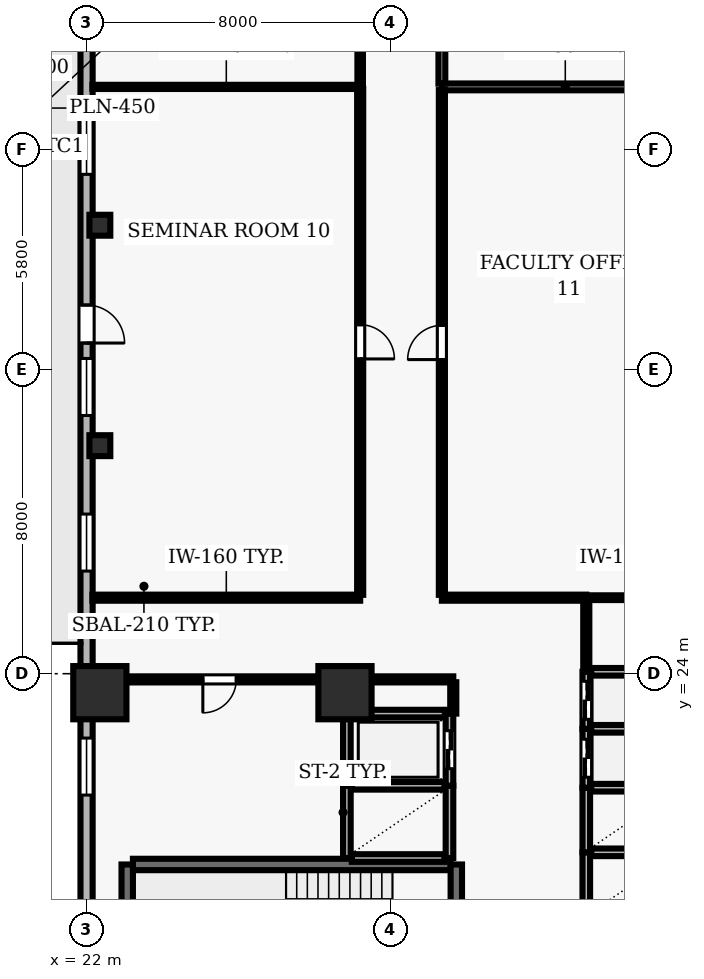
"""IFC4 building model, lengths in metres.
Left out: names, types, materials, properties, quantities, classifications, styles, units other than length and angle.
Written with IfcOpenShell. Run it as: python <this file> out.ifc"""

import sys

from ifc_helpers import new_model, si_unit, direction, frame, frame_2d, origin, origin_2d, place, context, subcontext, project, spatial, rectangle, hollow_rectangle, extrude, element, fill, save


model = new_model("IFC4")
c1 = context("Model", 3, precision=1e-05, world=origin(), true_north=direction((0.0, 1.0)))
c2 = subcontext(c1, "Body", "Model", "MODEL_VIEW")
j1 = project(units=[si_unit("LENGTHUNIT", "METRE"), si_unit("PLANEANGLEUNIT", "RADIAN")], contexts=[c1])
p1 = place(None, origin())
s1 = spatial("IfcSite", under=j1, at=p1, CompositionType="ELEMENT")
p2 = place(p1, origin())
s2 = spatial("IfcBuilding", under=s1, at=p2, CompositionType="ELEMENT")
p3 = place(p2, frame((0.0, 0.0, 58.3)))
s3 = spatial("IfcBuildingStorey", under=s2, at=p3, CompositionType="ELEMENT", Elevation=58.3)
for number, where, z_axis, x_axis in (
    (1, (22.35, 23.5, 0.0), (0.0, 0.0, 1.0), (1.0, 0.0, 0.0)),
    (2, (28.8, 23.5, 0.0), (0.0, 0.0, 1.0), (1.0, 0.0, 0.0)),
):
    element("IfcColumn", number, at=place(p3, frame(where, z_axis=z_axis, x_axis=x_axis)), inside=s3, PredefinedType="COLUMN", context=c2, shape_type="SweptSolid", body=[
        extrude(rectangle(XDim=1.4, YDim=1.4, at=origin_2d()), origin(), (0.0, 0.0, 1.0), 3.9),
    ])
for number, where, z_axis, x_axis in (
    (3, (22.35, 30.0, 0.0), (0.0, 0.0, 1.0), (1.0, 0.0, 0.0)),
    (4, (22.35, 35.8, 0.0), (0.0, 0.0, 1.0), (1.0, 0.0, 0.0)),
):
    element("IfcColumn", number, at=place(p3, frame(where, z_axis=z_axis, x_axis=x_axis)), inside=s3, PredefinedType="COLUMN", context=c2, shape_type="SweptSolid", body=[
        extrude(hollow_rectangle(XDim=0.55, YDim=0.55, WallThickness=0.025, at=origin_2d()), origin(), (0.0, 0.0, 1.0), 3.9),
    ])
p4 = place(p3, frame((22.0, 51.5, 0.0), z_axis=(0.0, 0.0, 1.0), x_axis=(0.0, -1.0, 0.0)))
e5 = element("IfcWall", 5, at=p4, inside=s3, PredefinedType="SOLIDWALL", context=c2, shape_type="SweptSolid", body=[
    extrude(rectangle(XDim=49.0, YDim=0.32, at=frame_2d((24.5, 0.0))), origin(), (0.0, 0.0, 1.0), 3.69),
])
p5 = place(p4, frame((17.8, 0.0, 0.0)))
e6 = element("IfcOpeningElement", 6, at=p5, cuts=e5, PredefinedType="OPENING", context=c2, shape_type="SweptSolid", body=[
    extrude(rectangle(XDim=1.0, YDim=2.2, at=frame_2d((0.5, 1.1))), frame((0.0, 0.17, 0.0), z_axis=(0.0, -1.0, 0.0), x_axis=(1.0, 0.0, 0.0)), (0.0, 0.0, 1.0), 0.34),
])
p6 = place(p4, frame((1.972, 0.0, 0.9)))
e7 = element("IfcOpeningElement", 7, at=p6, cuts=e5, PredefinedType="OPENING", context=c2, shape_type="SweptSolid", body=[
    extrude(rectangle(XDim=1.5, YDim=1.6, at=frame_2d((0.75, 0.8))), frame((0.0, 0.17, 0.0), z_axis=(0.0, -1.0, 0.0), x_axis=(1.0, 0.0, 0.0)), (0.0, 0.0, 1.0), 0.34),
])
p7 = place(p4, frame((7.417, 0.0, 0.9)))
e8 = element("IfcOpeningElement", 8, at=p7, cuts=e5, PredefinedType="OPENING", context=c2, shape_type="SweptSolid", body=[
    extrude(rectangle(XDim=1.5, YDim=1.6, at=frame_2d((0.75, 0.8))), frame((0.0, 0.17, 0.0), z_axis=(0.0, -1.0, 0.0), x_axis=(1.0, 0.0, 0.0)), (0.0, 0.0, 1.0), 0.34),
])
p8 = place(p4, frame((12.861, 0.0, 0.9)))
e9 = element("IfcOpeningElement", 9, at=p8, cuts=e5, PredefinedType="OPENING", context=c2, shape_type="SweptSolid", body=[
    extrude(rectangle(XDim=1.5, YDim=1.6, at=frame_2d((0.75, 0.8))), frame((0.0, 0.17, 0.0), z_axis=(0.0, -1.0, 0.0), x_axis=(1.0, 0.0, 0.0)), (0.0, 0.0, 1.0), 0.34),
])
p9 = place(p4, frame((19.206, 0.0, 0.9)))
e10 = element("IfcOpeningElement", 10, at=p9, cuts=e5, PredefinedType="OPENING", context=c2, shape_type="SweptSolid", body=[
    extrude(rectangle(XDim=1.5, YDim=1.6, at=frame_2d((0.75, 0.8))), frame((0.0, 0.17, 0.0), z_axis=(0.0, -1.0, 0.0), x_axis=(1.0, 0.0, 0.0)), (0.0, 0.0, 1.0), 0.34),
])
p10 = place(p4, frame((23.3, 0.0, 0.9)))
e11 = element("IfcOpeningElement", 11, at=p10, cuts=e5, PredefinedType="OPENING", context=c2, shape_type="SweptSolid", body=[
    extrude(rectangle(XDim=1.5, YDim=1.6, at=frame_2d((0.75, 0.8))), frame((0.0, 0.17, 0.0), z_axis=(0.0, -1.0, 0.0), x_axis=(1.0, 0.0, 0.0)), (0.0, 0.0, 1.0), 0.34),
])
p11 = place(p4, frame((29.194, 0.0, 0.9)))
e12 = element("IfcOpeningElement", 12, at=p11, cuts=e5, PredefinedType="OPENING", context=c2, shape_type="SweptSolid", body=[
    extrude(rectangle(XDim=1.5, YDim=1.6, at=frame_2d((0.75, 0.8))), frame((0.0, 0.17, 0.0), z_axis=(0.0, -1.0, 0.0), x_axis=(1.0, 0.0, 0.0)), (0.0, 0.0, 1.0), 0.34),
])
p12 = place(p4, frame((34.189, 0.0, 0.9)))
e13 = element("IfcOpeningElement", 13, at=p12, cuts=e5, PredefinedType="OPENING", context=c2, shape_type="SweptSolid", body=[
    extrude(rectangle(XDim=1.5, YDim=1.6, at=frame_2d((0.75, 0.8))), frame((0.0, 0.17, 0.0), z_axis=(0.0, -1.0, 0.0), x_axis=(1.0, 0.0, 0.0)), (0.0, 0.0, 1.0), 0.34),
])
p13 = place(p4, frame((40.083, 0.0, 0.9)))
e14 = element("IfcOpeningElement", 14, at=p13, cuts=e5, PredefinedType="OPENING", context=c2, shape_type="SweptSolid", body=[
    extrude(rectangle(XDim=1.5, YDim=1.6, at=frame_2d((0.75, 0.8))), frame((0.0, 0.17, 0.0), z_axis=(0.0, -1.0, 0.0), x_axis=(1.0, 0.0, 0.0)), (0.0, 0.0, 1.0), 0.34),
])
p14 = place(p3, frame((31.58, 18.98, 0.0), z_axis=(0.0, 0.0, 1.0), x_axis=(-1.0, 0.0, 0.0)))
e15 = element("IfcWall", 15, at=p14, inside=s3, PredefinedType="SHEAR", context=c2, shape_type="SweptSolid", body=[
    extrude(rectangle(XDim=8.36, YDim=0.3, at=frame_2d((4.18, 0.0))), origin(), (0.0, 0.0, 1.0), 3.69),
])
p15 = place(p3, frame((23.07, 18.98, 0.0), z_axis=(0.0, 0.0, 1.0), x_axis=(0.0, -1.0, 0.0)))
e16 = element("IfcWall", 16, at=p15, inside=s3, PredefinedType="SHEAR", context=c2, shape_type="SweptSolid", body=[
    extrude(rectangle(XDim=3.51, YDim=0.3, at=frame_2d((1.755, 0.0))), origin(), (0.0, 0.0, 1.0), 3.69),
])
p16 = place(p3, frame((31.73, 15.47, 0.0), z_axis=(0.0, 0.0, 1.0), x_axis=(0.0, 1.0, 0.0)))
e17 = element("IfcWall", 17, at=p16, inside=s3, PredefinedType="SHEAR", context=c2, shape_type="SweptSolid", body=[
    extrude(rectangle(XDim=3.51, YDim=0.3, at=frame_2d((1.755, 0.0))), origin(), (0.0, 0.0, 1.0), 3.69),
])
p17 = place(p16, frame((1.18, 0.0, 0.0)))
e18 = element("IfcOpeningElement", 18, at=p17, cuts=e17, PredefinedType="OPENING", context=c2, shape_type="SweptSolid", body=[
    extrude(rectangle(XDim=1.15, YDim=2.15, at=frame_2d((0.575, 1.075))), frame((0.0, 0.16, 0.0), z_axis=(0.0, -1.0, 0.0), x_axis=(1.0, 0.0, 0.0)), (0.0, 0.0, 1.0), 0.32),
])
p18 = place(p3, frame((35.15, 19.3, 0.0), z_axis=(0.0, 0.0, 1.0), x_axis=(0.0, -1.0, 0.0)))
e19 = element("IfcWall", 19, at=p18, inside=s3, PredefinedType="SOLIDWALL", context=c2, shape_type="SweptSolid", body=[
    extrude(rectangle(XDim=1.7, YDim=0.2, at=frame_2d((0.85, 0.0))), origin(), (0.0, 0.0, 1.0), 3.69),
])
p19 = place(p3, frame((37.42, 19.3, 0.0), z_axis=(0.0, 0.0, 1.0), x_axis=(-1.0, 0.0, 0.0)))
e20 = element("IfcWall", 20, at=p19, inside=s3, PredefinedType="SOLIDWALL", context=c2, shape_type="SweptSolid", body=[
    extrude(rectangle(XDim=2.14, YDim=0.2, at=frame_2d((1.07, 0.0))), origin(), (0.0, 0.0, 1.0), 3.69),
])
p20 = place(p3, frame((35.15, 21.0, 0.0), z_axis=(0.0, 0.0, 1.0), x_axis=(0.0, -1.0, 0.0)))
e21 = element("IfcWall", 21, at=p20, inside=s3, PredefinedType="SOLIDWALL", context=c2, shape_type="SweptSolid", body=[
    extrude(rectangle(XDim=1.7, YDim=0.2, at=frame_2d((0.85, 0.0))), origin(), (0.0, 0.0, 1.0), 3.69),
])
p21 = place(p3, frame((37.42, 21.0, 0.0), z_axis=(0.0, 0.0, 1.0), x_axis=(-1.0, 0.0, 0.0)))
e22 = element("IfcWall", 22, at=p21, inside=s3, PredefinedType="SOLIDWALL", context=c2, shape_type="SweptSolid", body=[
    extrude(rectangle(XDim=2.14, YDim=0.2, at=frame_2d((1.07, 0.0))), origin(), (0.0, 0.0, 1.0), 3.69),
])
for number, where, z_axis, x_axis in (
    (23, (28.85, 21.05, 0.0), (0.0, 0.0, 1.0), (0.0, -1.0, 0.0)),
    (24, (31.55, 19.15, 0.0), (0.0, 0.0, 1.0), (0.0, 1.0, 0.0)),
):
    element("IfcWall", number, at=place(p3, frame(where, z_axis=z_axis, x_axis=x_axis)), inside=s3, PredefinedType="SOLIDWALL", context=c2, shape_type="SweptSolid", body=[
        extrude(rectangle(XDim=1.9, YDim=0.2, at=frame_2d((0.95, 0.0))), origin(), (0.0, 0.0, 1.0), 3.69),
    ])
for number, where, z_axis, x_axis in (
    (25, (28.98, 19.15, 0.0), (0.0, 0.0, 1.0), (1.0, 0.0, 0.0)),
    (26, (31.42, 21.05, 0.0), (0.0, 0.0, 1.0), (-1.0, 0.0, 0.0)),
):
    element("IfcWall", number, at=place(p3, frame(where, z_axis=z_axis, x_axis=x_axis)), inside=s3, PredefinedType="SOLIDWALL", context=c2, shape_type="SweptSolid", body=[
        extrude(rectangle(XDim=2.44, YDim=0.2, at=frame_2d((1.22, 0.0))), origin(), (0.0, 0.0, 1.0), 3.69),
    ])
p22 = place(p3, frame((35.15, 22.55, 0.0), z_axis=(0.0, 0.0, 1.0), x_axis=(0.0, -1.0, 0.0)))
e27 = element("IfcWall", 27, at=p22, inside=s3, PredefinedType="SOLIDWALL", context=c2, shape_type="SweptSolid", body=[
    extrude(rectangle(XDim=1.55, YDim=0.2, at=frame_2d((0.775, 0.0))), origin(), (0.0, 0.0, 1.0), 3.69),
])
p23 = place(p22, frame((0.275, 0.0, 0.0)))
e28 = element("IfcOpeningElement", 28, at=p23, cuts=e27, PredefinedType="OPENING", context=c2, shape_type="SweptSolid", body=[
    extrude(rectangle(XDim=1.0, YDim=2.1, at=frame_2d((0.5, 1.05))), frame((0.0, 0.11, 0.0), z_axis=(0.0, -1.0, 0.0), x_axis=(1.0, 0.0, 0.0)), (0.0, 0.0, 1.0), 0.22),
])
p24 = place(p3, frame((37.42, 22.55, 0.0), z_axis=(0.0, 0.0, 1.0), x_axis=(-1.0, 0.0, 0.0)))
e29 = element("IfcWall", 29, at=p24, inside=s3, PredefinedType="SOLIDWALL", context=c2, shape_type="SweptSolid", body=[
    extrude(rectangle(XDim=2.14, YDim=0.2, at=frame_2d((1.07, 0.0))), origin(), (0.0, 0.0, 1.0), 3.69),
])
p25 = place(p3, frame((35.15, 24.05, 0.0), z_axis=(0.0, 0.0, 1.0), x_axis=(0.0, -1.0, 0.0)))
e30 = element("IfcWall", 30, at=p25, inside=s3, PredefinedType="SOLIDWALL", context=c2, shape_type="SweptSolid", body=[
    extrude(rectangle(XDim=1.5, YDim=0.2, at=frame_2d((0.75, 0.0))), origin(), (0.0, 0.0, 1.0), 3.69),
])
p26 = place(p25, frame((0.25, 0.0, 0.0)))
e31 = element("IfcOpeningElement", 31, at=p26, cuts=e30, PredefinedType="OPENING", context=c2, shape_type="SweptSolid", body=[
    extrude(rectangle(XDim=1.0, YDim=2.1, at=frame_2d((0.5, 1.05))), frame((0.0, 0.11, 0.0), z_axis=(0.0, -1.0, 0.0), x_axis=(1.0, 0.0, 0.0)), (0.0, 0.0, 1.0), 0.22),
])
p27 = place(p3, frame((37.42, 24.05, 0.0), z_axis=(0.0, 0.0, 1.0), x_axis=(-1.0, 0.0, 0.0)))
e32 = element("IfcWall", 32, at=p27, inside=s3, PredefinedType="SOLIDWALL", context=c2, shape_type="SweptSolid", body=[
    extrude(rectangle(XDim=2.14, YDim=0.2, at=frame_2d((1.07, 0.0))), origin(), (0.0, 0.0, 1.0), 3.69),
])
p28 = place(p3, frame((28.85, 22.95, 0.0), z_axis=(0.0, 0.0, 1.0), x_axis=(0.0, -1.0, 0.0)))
e33 = element("IfcWall", 33, at=p28, inside=s3, PredefinedType="SOLIDWALL", context=c2, shape_type="SweptSolid", body=[
    extrude(rectangle(XDim=1.9, YDim=0.2, at=frame_2d((0.95, 0.0))), origin(), (0.0, 0.0, 1.0), 3.69),
])
p29 = place(p3, frame((31.55, 21.05, 0.0), z_axis=(0.0, 0.0, 1.0), x_axis=(0.0, 1.0, 0.0)))
e34 = element("IfcWall", 34, at=p29, inside=s3, PredefinedType="SOLIDWALL", context=c2, shape_type="SweptSolid", body=[
    extrude(rectangle(XDim=1.9, YDim=0.2, at=frame_2d((0.95, 0.0))), origin(), (0.0, 0.0, 1.0), 3.69),
])
p30 = place(p29, frame((0.45, 0.0, 0.0)))
e35 = element("IfcOpeningElement", 35, at=p30, cuts=e34, PredefinedType="OPENING", context=c2, shape_type="SweptSolid", body=[
    extrude(rectangle(XDim=1.0, YDim=2.1, at=frame_2d((0.5, 1.05))), frame((0.0, 0.11, 0.0), z_axis=(0.0, -1.0, 0.0), x_axis=(1.0, 0.0, 0.0)), (0.0, 0.0, 1.0), 0.22),
])
p31 = place(p3, frame((31.43, 22.95, 0.0), z_axis=(0.0, 0.0, 1.0), x_axis=(-1.0, 0.0, 0.0)))
e36 = element("IfcWall", 36, at=p31, inside=s3, PredefinedType="SOLIDWALL", context=c2, shape_type="SweptSolid", body=[
    extrude(rectangle(XDim=2.46, YDim=0.2, at=frame_2d((1.23, 0.0))), origin(), (0.0, 0.0, 1.0), 3.69),
])
p32 = place(p3, frame((28.8, 23.85, 0.0), z_axis=(0.0, 0.0, 1.0), x_axis=(-1.0, 0.0, 0.0)))
e37 = element("IfcWall", 37, at=p32, inside=s3, PredefinedType="PARTITIONING", context=c2, shape_type="SweptSolid", body=[
    extrude(rectangle(XDim=6.6, YDim=0.16, at=frame_2d((3.3, 0.0))), origin(), (0.0, 0.0, 1.0), 3.055),
])
p33 = place(p32, frame((2.86, 0.0, 0.0)))
e38 = element("IfcOpeningElement", 38, at=p33, cuts=e37, PredefinedType="OPENING", context=c2, shape_type="SweptSolid", body=[
    extrude(rectangle(XDim=0.88, YDim=2.1, at=frame_2d((0.44, 1.05))), frame((0.0, 0.09, 0.0), z_axis=(0.0, -1.0, 0.0), x_axis=(1.0, 0.0, 0.0)), (0.0, 0.0, 1.0), 0.18),
])
p34 = place(p3, frame((28.8, 23.85, 0.0), z_axis=(0.0, 0.0, 1.0), x_axis=(1.0, 0.0, 0.0)))
e39 = element("IfcWall", 39, at=p34, inside=s3, PredefinedType="PARTITIONING", context=c2, shape_type="SweptSolid", body=[
    extrude(rectangle(XDim=2.85, YDim=0.16, at=frame_2d((1.425, 0.0))), origin(), (0.0, 0.0, 1.0), 3.69),
])
p35 = place(p3, frame((29.2, 26.0, 0.0), z_axis=(0.0, 0.0, 1.0), x_axis=(-1.0, 0.0, 0.0)))
e40 = element("IfcWall", 40, at=p35, inside=s3, PredefinedType="PARTITIONING", context=c2, shape_type="SweptSolid", body=[
    extrude(rectangle(XDim=7.045, YDim=0.16, at=frame_2d((3.522, 0.0))), origin(), (0.0, 0.0, 1.0), 3.69),
])
p36 = place(p3, frame((29.2, 39.44, 0.0), z_axis=(0.0, 0.0, 1.0), x_axis=(-1.0, 0.0, 0.0)))
e41 = element("IfcWall", 41, at=p36, inside=s3, PredefinedType="MOVABLE", context=c2, shape_type="SweptSolid", body=[
    extrude(rectangle(XDim=7.045, YDim=0.11, at=frame_2d((3.522, 0.0))), origin(), (0.0, 0.0, 1.0), 3.69),
])
p37 = place(p3, frame((35.15, 26.0, 0.0), z_axis=(0.0, 0.0, 1.0), x_axis=(-1.0, 0.0, 0.0)))
e42 = element("IfcWall", 42, at=p37, inside=s3, PredefinedType="PARTITIONING", context=c2, shape_type="SweptSolid", body=[
    extrude(rectangle(XDim=3.8, YDim=0.16, at=frame_2d((1.9, 0.0))), origin(), (0.0, 0.0, 1.0), 3.69),
])
p38 = place(p3, frame((35.15, 26.0, 0.0), z_axis=(0.0, 0.0, 1.0), x_axis=(1.0, 0.0, 0.0)))
e43 = element("IfcWall", 43, at=p38, inside=s3, PredefinedType="PARTITIONING", context=c2, shape_type="SweptSolid", body=[
    extrude(rectangle(XDim=2.7, YDim=0.125, at=frame_2d((1.35, 0.0))), origin(), (0.0, 0.0, 1.0), 3.69),
])
p39 = place(p3, frame((37.845, 39.44, 0.0), z_axis=(0.0, 0.0, 1.0), x_axis=(-1.0, 0.0, 0.0)))
e44 = element("IfcWall", 44, at=p39, inside=s3, PredefinedType="PARTITIONING", context=c2, shape_type="SweptSolid", body=[
    extrude(rectangle(XDim=6.495, YDim=0.18, at=frame_2d((3.248, 0.0))), origin(), (0.0, 0.0, 1.0), 3.69),
])
p40 = place(p3, frame((28.8, 22.95, 0.0), z_axis=(0.0, 0.0, 1.0), x_axis=(0.0, 1.0, 0.0)))
e45 = element("IfcWall", 45, at=p40, inside=s3, PredefinedType="PARTITIONING", context=c2, shape_type="SweptSolid", body=[
    extrude(rectangle(XDim=0.825, YDim=0.135, at=frame_2d((0.413, 0.0))), origin(), (0.0, 0.0, 1.0), 3.69),
])
p41 = place(p3, frame((29.2, 39.39, 0.0), z_axis=(0.0, 0.0, 1.0), x_axis=(0.0, -1.0, 0.0)))
e46 = element("IfcWall", 46, at=p41, inside=s3, PredefinedType="PARTITIONING", context=c2, shape_type="SweptSolid", body=[
    extrude(rectangle(XDim=13.315, YDim=0.16, at=frame_2d((6.657, 0.0))), origin(), (0.0, 0.0, 1.0), 3.69),
])
p42 = place(p41, frame((6.208, 0.0, 0.0)))
e47 = element("IfcOpeningElement", 47, at=p42, cuts=e46, PredefinedType="OPENING", context=c2, shape_type="SweptSolid", body=[
    extrude(rectangle(XDim=0.9, YDim=2.1, at=frame_2d((0.45, 1.05))), frame((0.0, 0.09, 0.0), z_axis=(0.0, -1.0, 0.0), x_axis=(1.0, 0.0, 0.0)), (0.0, 0.0, 1.0), 0.18),
])
p43 = place(p3, frame((29.2, 53.845, 0.0), z_axis=(0.0, 0.0, 1.0), x_axis=(0.0, -1.0, 0.0)))
e48 = element("IfcWall", 48, at=p43, inside=s3, PredefinedType="PARTITIONING", context=c2, shape_type="SweptSolid", body=[
    extrude(rectangle(XDim=14.355, YDim=0.145, at=frame_2d((7.177, 0.0))), origin(), (0.0, 0.0, 1.0), 3.69),
])
p44 = place(p43, frame((6.627, 0.0, 0.0)))
e49 = element("IfcOpeningElement", 49, at=p44, cuts=e48, PredefinedType="OPENING", context=c2, shape_type="SweptSolid", body=[
    extrude(rectangle(XDim=1.1, YDim=2.15, at=frame_2d((0.55, 1.075))), frame((0.0, 0.083, 0.0), z_axis=(0.0, -1.0, 0.0), x_axis=(1.0, 0.0, 0.0)), (0.0, 0.0, 1.0), 0.165),
])
p45 = place(p3, frame((31.35, 26.075, 0.0), z_axis=(0.0, 0.0, 1.0), x_axis=(0.0, 1.0, 0.0)))
e50 = element("IfcWall", 50, at=p45, inside=s3, PredefinedType="PARTITIONING", context=c2, shape_type="SweptSolid", body=[
    extrude(rectangle(XDim=13.28, YDim=0.16, at=frame_2d((6.64, 0.0))), origin(), (0.0, 0.0, 1.0), 3.69),
])
p46 = place(p45, frame((6.19, 0.0, 0.0)))
e51 = element("IfcOpeningElement", 51, at=p46, cuts=e50, PredefinedType="OPENING", context=c2, shape_type="SweptSolid", body=[
    extrude(rectangle(XDim=0.9, YDim=2.1, at=frame_2d((0.45, 1.05))), frame((0.0, 0.09, 0.0), z_axis=(0.0, -1.0, 0.0), x_axis=(1.0, 0.0, 0.0)), (0.0, 0.0, 1.0), 0.18),
])
p47 = place(p3, frame((31.35, 39.525, 0.0), z_axis=(0.0, 0.0, 1.0), x_axis=(0.0, 1.0, 0.0)))
e52 = element("IfcWall", 52, at=p47, inside=s3, PredefinedType="PARTITIONING", context=c2, shape_type="SweptSolid", body=[
    extrude(rectangle(XDim=14.32, YDim=0.18, at=frame_2d((7.16, 0.0))), origin(), (0.0, 0.0, 1.0), 3.69),
])
p48 = place(p47, frame((6.685, 0.0, 0.0)))
e53 = element("IfcOpeningElement", 53, at=p48, cuts=e52, PredefinedType="OPENING", context=c2, shape_type="SweptSolid", body=[
    extrude(rectangle(XDim=0.95, YDim=2.1, at=frame_2d((0.475, 1.05))), frame((0.0, 0.1, 0.0), z_axis=(0.0, -1.0, 0.0), x_axis=(1.0, 0.0, 0.0)), (0.0, 0.0, 1.0), 0.2),
])
p49 = place(p3, frame((31.65, 23.775, 0.0), z_axis=(0.0, 0.0, 1.0), x_axis=(0.0, -1.0, 0.0)))
e54 = element("IfcWall", 54, at=p49, inside=s3, PredefinedType="PARTITIONING", context=c2, shape_type="SweptSolid", body=[
    extrude(rectangle(XDim=0.825, YDim=0.16, at=frame_2d((0.413, 0.0))), origin(), (0.0, 0.0, 1.0), 3.69),
])
p50 = place(p3, frame((35.15, 24.07, 0.0), z_axis=(0.0, 0.0, 1.0), x_axis=(0.0, 1.0, 0.0)))
e55 = element("IfcWall", 55, at=p50, inside=s3, PredefinedType="PARTITIONING", context=c2, shape_type="SweptSolid", body=[
    extrude(rectangle(XDim=1.855, YDim=0.16, at=frame_2d((0.927, 0.0))), origin(), (0.0, 0.0, 1.0), 3.69),
])
p51 = place(p5, origin())
e56 = element("IfcDoor", 56, at=p51, inside=s3, OperationType="SINGLE_SWING_RIGHT", PredefinedType="DOOR", context=c2, shape_type="SweptSolid", body=[
    extrude(rectangle(XDim=1.0, YDim=2.2, at=frame_2d((0.5, 1.1))), frame((0.0, 0.025, 0.0), z_axis=(0.0, -1.0, 0.0), x_axis=(1.0, 0.0, 0.0)), (0.0, 0.0, 1.0), 0.05),
])
fill(e6, e56)
p52 = place(p8, origin())
e57 = element("IfcWindow", 57, at=p52, inside=s3, PartitioningType="SINGLE_PANEL", PredefinedType="WINDOW", context=c2, shape_type="SweptSolid", body=[
    extrude(rectangle(XDim=1.5, YDim=1.6, at=frame_2d((0.75, 0.8))), frame((0.0, 0.03, 0.0), z_axis=(0.0, -1.0, 0.0), x_axis=(1.0, 0.0, 0.0)), (0.0, 0.0, 1.0), 0.06),
])
fill(e9, e57)
p53 = place(p9, origin())
e58 = element("IfcWindow", 58, at=p53, inside=s3, PartitioningType="SINGLE_PANEL", PredefinedType="WINDOW", context=c2, shape_type="SweptSolid", body=[
    extrude(rectangle(XDim=1.5, YDim=1.6, at=frame_2d((0.75, 0.8))), frame((0.0, 0.03, 0.0), z_axis=(0.0, -1.0, 0.0), x_axis=(1.0, 0.0, 0.0)), (0.0, 0.0, 1.0), 0.06),
])
fill(e10, e58)
p54 = place(p10, origin())
e59 = element("IfcWindow", 59, at=p54, inside=s3, PartitioningType="SINGLE_PANEL", PredefinedType="WINDOW", context=c2, shape_type="SweptSolid", body=[
    extrude(rectangle(XDim=1.5, YDim=1.6, at=frame_2d((0.75, 0.8))), frame((0.0, 0.03, 0.0), z_axis=(0.0, -1.0, 0.0), x_axis=(1.0, 0.0, 0.0)), (0.0, 0.0, 1.0), 0.06),
])
fill(e11, e59)
p55 = place(p11, origin())
e60 = element("IfcWindow", 60, at=p55, inside=s3, PartitioningType="SINGLE_PANEL", PredefinedType="WINDOW", context=c2, shape_type="SweptSolid", body=[
    extrude(rectangle(XDim=1.5, YDim=1.6, at=frame_2d((0.75, 0.8))), frame((0.0, 0.03, 0.0), z_axis=(0.0, -1.0, 0.0), x_axis=(1.0, 0.0, 0.0)), (0.0, 0.0, 1.0), 0.06),
])
fill(e12, e60)
p56 = place(p23, origin())
e61 = element("IfcDoor", 61, at=p56, inside=s3, OperationType="DOUBLE_DOOR_SLIDING", PredefinedType="DOOR", context=c2, shape_type="SweptSolid", body=[
    extrude(rectangle(XDim=1.0, YDim=2.1, at=frame_2d((0.5, 1.05))), frame((0.0, 0.025, 0.0), z_axis=(0.0, -1.0, 0.0), x_axis=(1.0, 0.0, 0.0)), (0.0, 0.0, 1.0), 0.05),
])
fill(e28, e61)
p57 = place(p26, origin())
e62 = element("IfcDoor", 62, at=p57, inside=s3, OperationType="DOUBLE_DOOR_SLIDING", PredefinedType="DOOR", context=c2, shape_type="SweptSolid", body=[
    extrude(rectangle(XDim=1.0, YDim=2.1, at=frame_2d((0.5, 1.05))), frame((0.0, 0.025, 0.0), z_axis=(0.0, -1.0, 0.0), x_axis=(1.0, 0.0, 0.0)), (0.0, 0.0, 1.0), 0.05),
])
fill(e31, e62)
p58 = place(p30, origin())
e63 = element("IfcDoor", 63, at=p58, inside=s3, OperationType="DOUBLE_DOOR_SLIDING", PredefinedType="DOOR", context=c2, shape_type="SweptSolid", body=[
    extrude(rectangle(XDim=1.0, YDim=2.1, at=frame_2d((0.5, 1.05))), frame((0.0, 0.025, 0.0), z_axis=(0.0, -1.0, 0.0), x_axis=(1.0, 0.0, 0.0)), (0.0, 0.0, 1.0), 0.05),
])
fill(e35, e63)
p59 = place(p33, origin())
e64 = element("IfcDoor", 64, at=p59, inside=s3, OperationType="SINGLE_SWING_RIGHT", PredefinedType="DOOR", context=c2, shape_type="SweptSolid", body=[
    extrude(rectangle(XDim=0.88, YDim=2.1, at=frame_2d((0.44, 1.05))), frame((0.0, 0.025, 0.0), z_axis=(0.0, -1.0, 0.0), x_axis=(1.0, 0.0, 0.0)), (0.0, 0.0, 1.0), 0.05),
])
fill(e38, e64)
p60 = place(p42, origin())
e65 = element("IfcDoor", 65, at=p60, inside=s3, OperationType="SINGLE_SWING_RIGHT", PredefinedType="DOOR", context=c2, shape_type="SweptSolid", body=[
    extrude(rectangle(XDim=0.9, YDim=2.1, at=frame_2d((0.45, 1.05))), frame((0.0, 0.025, 0.0), z_axis=(0.0, -1.0, 0.0), x_axis=(1.0, 0.0, 0.0)), (0.0, 0.0, 1.0), 0.05),
])
fill(e47, e65)
p61 = place(p46, origin())
e66 = element("IfcDoor", 66, at=p61, inside=s3, OperationType="SINGLE_SWING_LEFT", PredefinedType="DOOR", context=c2, shape_type="SweptSolid", body=[
    extrude(rectangle(XDim=0.9, YDim=2.1, at=frame_2d((0.45, 1.05))), frame((0.0, 0.025, 0.0), z_axis=(0.0, -1.0, 0.0), x_axis=(1.0, 0.0, 0.0)), (0.0, 0.0, 1.0), 0.05),
])
fill(e51, e66)
save(model, sys.argv[1])
